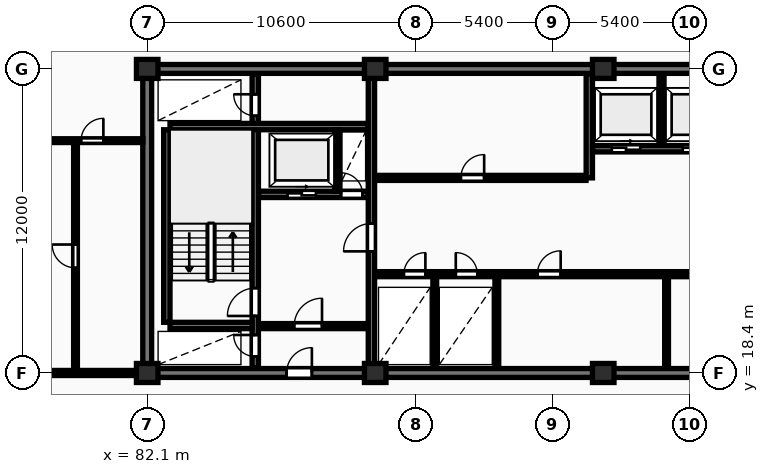
"""IFC4 building model, lengths in metres.
Left out: names, types, materials, properties, quantities, classifications, styles, units other than length and angle.
Written with IfcOpenShell. Run it as: python <this file> out.ifc"""

import sys

from ifc_helpers import new_model, si_unit, direction, frame, frame_2d, origin, origin_2d, place, context, subcontext, project, spatial, rectangle, extrude, element, fill, save


model = new_model("IFC4")
c1 = context("Model", 3, precision=1e-05, world=origin(), true_north=direction((0.0, 1.0)))
c2 = subcontext(c1, "Body", "Model", "MODEL_VIEW")
j1 = project(units=[si_unit("LENGTHUNIT", "METRE"), si_unit("PLANEANGLEUNIT", "RADIAN")], contexts=[c1])
p1 = place(None, origin())
s1 = spatial("IfcSite", under=j1, at=p1, CompositionType="ELEMENT")
p2 = place(p1, origin())
s2 = spatial("IfcBuilding", under=s1, at=p2, CompositionType="ELEMENT")
p3 = place(p2, frame((0.0, 0.0, 132.8)))
s3 = spatial("IfcBuildingStorey", under=s2, at=p3, CompositionType="ELEMENT", Elevation=132.8)
for number, where, z_axis, x_axis in (
    (1, (82.1, 18.4, 0.0), (0.0, 0.0, 1.0), (1.0, 0.0, 0.0)),
    (2, (82.1, 30.4, 0.0), (0.0, 0.0, 1.0), (1.0, 0.0, 0.0)),
    (3, (91.1, 18.4, 0.0), (0.0, 0.0, 1.0), (1.0, 0.0, 0.0)),
    (4, (91.1, 30.4, 0.0), (0.0, 0.0, 1.0), (1.0, 0.0, 0.0)),
    (5, (100.1, 18.4, 0.0), (0.0, 0.0, 1.0), (1.0, 0.0, 0.0)),
    (6, (100.1, 30.4, 0.0), (0.0, 0.0, 1.0), (1.0, 0.0, 0.0)),
):
    element("IfcColumn", number, at=place(p3, frame(where, z_axis=z_axis, x_axis=x_axis)), inside=s3, PredefinedType="COLUMN", context=c2, shape_type="SweptSolid", body=[
        extrude(rectangle(XDim=0.85, YDim=0.75, at=origin_2d()), origin(), (0.0, 0.0, 1.0), 3.25),
    ])
p4 = place(p3, frame((81.925, 30.4, 0.0), z_axis=(0.0, 0.0, 1.0), x_axis=(1.0, 0.0, 0.0)))
e7 = element("IfcWall", 7, at=p4, inside=s3, PredefinedType="SHEAR", context=c2, shape_type="SweptSolid", body=[
    extrude(rectangle(XDim=36.265, YDim=0.35, at=frame_2d((18.132, 0.0))), origin(), (0.0, 0.0, 1.0), 3.25),
])
p5 = place(p3, frame((82.1, 18.575, 0.0), z_axis=(0.0, 0.0, 1.0), x_axis=(0.0, 1.0, 0.0)))
e8 = element("IfcWall", 8, at=p5, inside=s3, PredefinedType="SHEAR", context=c2, shape_type="SweptSolid", body=[
    extrude(rectangle(XDim=11.65, YDim=0.35, at=frame_2d((5.825, 0.0))), origin(), (0.0, 0.0, 1.0), 3.25),
])
p6 = place(p3, frame((81.925, 18.4, 0.0), z_axis=(0.0, 0.0, 1.0), x_axis=(1.0, 0.0, 0.0)))
e9 = element("IfcWall", 9, at=p6, inside=s3, PredefinedType="SHEAR", context=c2, shape_type="SweptSolid", body=[
    extrude(rectangle(XDim=36.265, YDim=0.35, at=frame_2d((18.132, 0.0))), origin(), (0.0, 0.0, 1.0), 3.25),
])
p7 = place(p6, frame((5.675, 0.0, 0.0)))
e10 = element("IfcOpeningElement", 10, at=p7, cuts=e9, PredefinedType="OPENING", context=c2, shape_type="SweptSolid", body=[
    extrude(rectangle(XDim=1.0, YDim=2.15, at=frame_2d((0.5, 1.075))), frame((0.0, 0.185, 0.0), z_axis=(0.0, -1.0, 0.0), x_axis=(1.0, 0.0, 0.0)), (0.0, 0.0, 1.0), 0.37),
])
p8 = place(p6, frame((21.925, 0.0, 0.0)))
e11 = element("IfcOpeningElement", 11, at=p8, cuts=e9, PredefinedType="OPENING", context=c2, shape_type="SweptSolid", body=[
    extrude(rectangle(XDim=1.5, YDim=2.2, at=frame_2d((0.75, 1.1))), frame((0.0, 0.185, 0.0), z_axis=(0.0, -1.0, 0.0), x_axis=(1.0, 0.0, 0.0)), (0.0, 0.0, 1.0), 0.37),
])
p9 = place(p6, frame((29.875, 0.0, 0.0)))
e12 = element("IfcOpeningElement", 12, at=p9, cuts=e9, PredefinedType="OPENING", context=c2, shape_type="SweptSolid", body=[
    extrude(rectangle(XDim=1.0, YDim=2.15, at=frame_2d((0.5, 1.075))), frame((0.0, 0.185, 0.0), z_axis=(0.0, -1.0, 0.0), x_axis=(1.0, 0.0, 0.0)), (0.0, 0.0, 1.0), 0.37),
])
p10 = place(p3, frame((82.875, 20.4, 0.0), z_axis=(0.0, 0.0, 1.0), x_axis=(0.0, 1.0, 0.0)))
e13 = element("IfcWall", 13, at=p10, inside=s3, PredefinedType="SHEAR", context=c2, shape_type="SweptSolid", body=[
    extrude(rectangle(XDim=7.6, YDim=0.25, at=frame_2d((3.8, 0.0))), origin(), (0.0, 0.0, 1.0), 3.25),
])
p11 = place(p3, frame((86.365, 18.6, 0.0), z_axis=(0.0, 0.0, 1.0), x_axis=(0.0, 1.0, 0.0)))
e14 = element("IfcWall", 14, at=p11, inside=s3, PredefinedType="SHEAR", context=c2, shape_type="SweptSolid", body=[
    extrude(rectangle(XDim=11.6, YDim=0.25, at=frame_2d((5.8, 0.0))), origin(), (0.0, 0.0, 1.0), 3.25),
])
p12 = place(p11, frame((0.45, 0.0, 0.0)))
e15 = element("IfcOpeningElement", 15, at=p12, cuts=e14, PredefinedType="OPENING", context=c2, shape_type="SweptSolid", body=[
    extrude(rectangle(XDim=0.85, YDim=2.05, at=frame_2d((0.425, 1.025))), frame((0.0, 0.135, 0.0), z_axis=(0.0, -1.0, 0.0), x_axis=(1.0, 0.0, 0.0)), (0.0, 0.0, 1.0), 0.27),
])
p13 = place(p11, frame((2.05, 0.0, 0.0)))
e16 = element("IfcOpeningElement", 16, at=p13, cuts=e14, PredefinedType="OPENING", context=c2, shape_type="SweptSolid", body=[
    extrude(rectangle(XDim=1.1, YDim=2.1, at=frame_2d((0.55, 1.05))), frame((0.0, 0.135, 0.0), z_axis=(0.0, -1.0, 0.0), x_axis=(1.0, 0.0, 0.0)), (0.0, 0.0, 1.0), 0.27),
])
p14 = place(p11, frame((9.95, 0.0, 0.0)))
e17 = element("IfcOpeningElement", 17, at=p14, cuts=e14, PredefinedType="OPENING", context=c2, shape_type="SweptSolid", body=[
    extrude(rectangle(XDim=0.85, YDim=2.05, at=frame_2d((0.425, 1.025))), frame((0.0, 0.135, 0.0), z_axis=(0.0, -1.0, 0.0), x_axis=(1.0, 0.0, 0.0)), (0.0, 0.0, 1.0), 0.27),
])
p15 = place(p3, frame((83.0, 20.275, 0.0), z_axis=(0.0, 0.0, 1.0), x_axis=(1.0, 0.0, 0.0)))
e18 = element("IfcWall", 18, at=p15, inside=s3, PredefinedType="SHEAR", context=c2, shape_type="SweptSolid", body=[
    extrude(rectangle(XDim=3.24, YDim=0.25, at=frame_2d((1.62, 0.0))), origin(), (0.0, 0.0, 1.0), 3.25),
])
p16 = place(p3, frame((83.0, 28.125, 0.0), z_axis=(0.0, 0.0, 1.0), x_axis=(1.0, 0.0, 0.0)))
e19 = element("IfcWall", 19, at=p16, inside=s3, PredefinedType="SHEAR", context=c2, shape_type="SweptSolid", body=[
    extrude(rectangle(XDim=7.82, YDim=0.25, at=frame_2d((3.91, 0.0))), origin(), (0.0, 0.0, 1.0), 3.25),
])
p17 = place(p3, frame((86.5, 25.45, 0.0), z_axis=(0.0, 0.0, 1.0), x_axis=(1.0, 0.0, 0.0)))
e20 = element("IfcWall", 20, at=p17, inside=s3, PredefinedType="SHEAR", context=c2, shape_type="SweptSolid", body=[
    extrude(rectangle(XDim=4.32, YDim=0.25, at=frame_2d((2.16, 0.0))), origin(), (0.0, 0.0, 1.0), 3.25),
])
p18 = place(p17, frame((1.14, 0.0, 0.0)))
e21 = element("IfcOpeningElement", 21, at=p18, cuts=e20, PredefinedType="OPENING", context=c2, shape_type="SweptSolid", body=[
    extrude(rectangle(XDim=1.12, YDim=2.12, at=frame_2d((0.56, 1.06))), frame((0.0, 0.135, 0.0), z_axis=(0.0, -1.0, 0.0), x_axis=(1.0, 0.0, 0.0)), (0.0, 0.0, 1.0), 0.27),
])
p19 = place(p17, frame((3.25, 0.0, 0.0)))
e22 = element("IfcOpeningElement", 22, at=p19, cuts=e20, PredefinedType="OPENING", context=c2, shape_type="SweptSolid", body=[
    extrude(rectangle(XDim=0.85, YDim=2.05, at=frame_2d((0.425, 1.025))), frame((0.0, 0.135, 0.0), z_axis=(0.0, -1.0, 0.0), x_axis=(1.0, 0.0, 0.0)), (0.0, 0.0, 1.0), 0.27),
])
p20 = place(p3, frame((89.6, 25.58, 0.0), z_axis=(0.0, 0.0, 1.0), x_axis=(0.0, 1.0, 0.0)))
e23 = element("IfcWall", 23, at=p20, inside=s3, PredefinedType="PARTITIONING", context=c2, shape_type="SweptSolid", body=[
    extrude(rectangle(XDim=2.42, YDim=0.2, at=frame_2d((1.21, 0.0))), origin(), (0.0, 0.0, 1.0), 2.97),
])
p21 = place(p3, frame((86.5, 20.25, 0.0), z_axis=(0.0, 0.0, 1.0), x_axis=(1.0, 0.0, 0.0)))
e24 = element("IfcWall", 24, at=p21, inside=s3, PredefinedType="PARTITIONING", context=c2, shape_type="SweptSolid", body=[
    extrude(rectangle(XDim=4.32, YDim=0.2, at=frame_2d((2.16, 0.0))), origin(), (0.0, 0.0, 1.0), 2.97),
])
p22 = place(p21, frame((1.4, 0.0, 0.0)))
e25 = element("IfcOpeningElement", 25, at=p22, cuts=e24, PredefinedType="OPENING", context=c2, shape_type="SweptSolid", body=[
    extrude(rectangle(XDim=1.1, YDim=2.1, at=frame_2d((0.55, 1.05))), frame((0.0, 0.11, 0.0), z_axis=(0.0, -1.0, 0.0), x_axis=(1.0, 0.0, 0.0)), (0.0, 0.0, 1.0), 0.22),
])
p23 = place(p3, frame((90.95, 18.6, 0.0), z_axis=(0.0, 0.0, 1.0), x_axis=(0.0, 1.0, 0.0)))
e26 = element("IfcWall", 26, at=p23, inside=s3, PredefinedType="SHEAR", context=c2, shape_type="SweptSolid", body=[
    extrude(rectangle(XDim=11.6, YDim=0.25, at=frame_2d((5.8, 0.0))), origin(), (0.0, 0.0, 1.0), 3.25),
])
p24 = place(p23, frame((4.6, 0.0, 0.0)))
e27 = element("IfcOpeningElement", 27, at=p24, cuts=e26, PredefinedType="OPENING", context=c2, shape_type="SweptSolid", body=[
    extrude(rectangle(XDim=1.1, YDim=2.1, at=frame_2d((0.55, 1.05))), frame((0.0, 0.135, 0.0), z_axis=(0.0, -1.0, 0.0), x_axis=(1.0, 0.0, 0.0)), (0.0, 0.0, 1.0), 0.27),
])
p25 = place(p3, frame((91.08, 26.1, 0.0), z_axis=(0.0, 0.0, 1.0), x_axis=(1.0, 0.0, 0.0)))
e28 = element("IfcWall", 28, at=p25, inside=s3, PredefinedType="PARTITIONING", context=c2, shape_type="SweptSolid", body=[
    extrude(rectangle(XDim=8.34, YDim=0.2, at=frame_2d((4.17, 0.0))), origin(), (0.0, 0.0, 1.0), 2.97),
])
p26 = place(p25, frame((3.4, 0.0, 0.0)))
e29 = element("IfcOpeningElement", 29, at=p26, cuts=e28, PredefinedType="OPENING", context=c2, shape_type="SweptSolid", body=[
    extrude(rectangle(XDim=0.92, YDim=2.08, at=frame_2d((0.46, 1.04))), frame((0.0, 0.11, 0.0), z_axis=(0.0, -1.0, 0.0), x_axis=(1.0, 0.0, 0.0)), (0.0, 0.0, 1.0), 0.22),
])
p27 = place(p3, frame((99.55, 26.1, 0.0), z_axis=(0.0, 0.0, 1.0), x_axis=(0.0, 1.0, 0.0)))
e30 = element("IfcWall", 30, at=p27, inside=s3, PredefinedType="SHEAR", context=c2, shape_type="SweptSolid", body=[
    extrude(rectangle(XDim=4.1, YDim=0.25, at=frame_2d((2.05, 0.0))), origin(), (0.0, 0.0, 1.0), 3.25),
])
p28 = place(p3, frame((102.4, 27.38, 0.0), z_axis=(0.0, 0.0, 1.0), x_axis=(0.0, 1.0, 0.0)))
e31 = element("IfcWall", 31, at=p28, inside=s3, PredefinedType="PARTITIONING", context=c2, shape_type="SweptSolid", body=[
    extrude(rectangle(XDim=2.82, YDim=0.2, at=frame_2d((1.41, 0.0))), origin(), (0.0, 0.0, 1.0), 2.97),
])
p29 = place(p3, frame((99.68, 27.25, 0.0), z_axis=(0.0, 0.0, 1.0), x_axis=(1.0, 0.0, 0.0)))
e32 = element("IfcWall", 32, at=p29, inside=s3, PredefinedType="SHEAR", context=c2, shape_type="SweptSolid", body=[
    extrude(rectangle(XDim=10.54, YDim=0.25, at=frame_2d((5.27, 0.0))), origin(), (0.0, 0.0, 1.0), 3.25),
])
p30 = place(p29, frame((0.76, 0.0, 0.0)))
e33 = element("IfcOpeningElement", 33, at=p30, cuts=e32, PredefinedType="OPENING", context=c2, shape_type="SweptSolid", body=[
    extrude(rectangle(XDim=1.12, YDim=2.12, at=frame_2d((0.56, 1.06))), frame((0.0, 0.135, 0.0), z_axis=(0.0, -1.0, 0.0), x_axis=(1.0, 0.0, 0.0)), (0.0, 0.0, 1.0), 0.27),
])
p31 = place(p29, frame((3.56, 0.0, 0.0)))
e34 = element("IfcOpeningElement", 34, at=p31, cuts=e32, PredefinedType="OPENING", context=c2, shape_type="SweptSolid", body=[
    extrude(rectangle(XDim=1.12, YDim=2.12, at=frame_2d((0.56, 1.06))), frame((0.0, 0.135, 0.0), z_axis=(0.0, -1.0, 0.0), x_axis=(1.0, 0.0, 0.0)), (0.0, 0.0, 1.0), 0.27),
])
p32 = place(p29, frame((6.36, 0.0, 0.0)))
e35 = element("IfcOpeningElement", 35, at=p32, cuts=e32, PredefinedType="OPENING", context=c2, shape_type="SweptSolid", body=[
    extrude(rectangle(XDim=1.12, YDim=2.12, at=frame_2d((0.56, 1.06))), frame((0.0, 0.135, 0.0), z_axis=(0.0, -1.0, 0.0), x_axis=(1.0, 0.0, 0.0)), (0.0, 0.0, 1.0), 0.27),
])
p33 = place(p29, frame((8.92, 0.0, 0.0)))
e36 = element("IfcOpeningElement", 36, at=p33, cuts=e32, PredefinedType="OPENING", context=c2, shape_type="SweptSolid", body=[
    extrude(rectangle(XDim=0.85, YDim=2.05, at=frame_2d((0.425, 1.025))), frame((0.0, 0.135, 0.0), z_axis=(0.0, -1.0, 0.0), x_axis=(1.0, 0.0, 0.0)), (0.0, 0.0, 1.0), 0.27),
])
for number, where, z_axis, x_axis in (
    (37, (93.45, 18.6, 0.0), (0.0, 0.0, 1.0), (0.0, 1.0, 0.0)),
    (38, (95.9, 18.6, 0.0), (0.0, 0.0, 1.0), (0.0, 1.0, 0.0)),
    (39, (102.6, 18.6, 0.0), (0.0, 0.0, 1.0), (0.0, 1.0, 0.0)),
):
    element("IfcWall", number, at=place(p3, frame(where, z_axis=z_axis, x_axis=x_axis)), inside=s3, PredefinedType="PARTITIONING", context=c2, shape_type="SweptSolid", body=[
        extrude(rectangle(XDim=3.6, YDim=0.15, at=frame_2d((1.8, 0.0))), origin(), (0.0, 0.0, 1.0), 2.97),
    ])
p34 = place(p3, frame((91.08, 22.3, 0.0), z_axis=(0.0, 0.0, 1.0), x_axis=(1.0, 0.0, 0.0)))
e40 = element("IfcWall", 40, at=p34, inside=s3, PredefinedType="PARTITIONING", context=c2, shape_type="SweptSolid", body=[
    extrude(rectangle(XDim=19.14, YDim=0.2, at=frame_2d((9.57, 0.0))), origin(), (0.0, 0.0, 1.0), 2.97),
])
p35 = place(p34, frame((1.15, 0.0, 0.0)))
e41 = element("IfcOpeningElement", 41, at=p35, cuts=e40, PredefinedType="OPENING", context=c2, shape_type="SweptSolid", body=[
    extrude(rectangle(XDim=0.85, YDim=2.05, at=frame_2d((0.425, 1.025))), frame((0.0, 0.11, 0.0), z_axis=(0.0, -1.0, 0.0), x_axis=(1.0, 0.0, 0.0)), (0.0, 0.0, 1.0), 0.22),
])
p36 = place(p34, frame((3.2, 0.0, 0.0)))
e42 = element("IfcOpeningElement", 42, at=p36, cuts=e40, PredefinedType="OPENING", context=c2, shape_type="SweptSolid", body=[
    extrude(rectangle(XDim=0.85, YDim=2.05, at=frame_2d((0.425, 1.025))), frame((0.0, 0.11, 0.0), z_axis=(0.0, -1.0, 0.0), x_axis=(1.0, 0.0, 0.0)), (0.0, 0.0, 1.0), 0.22),
])
p37 = place(p34, frame((12.72, 0.0, 0.0)))
e43 = element("IfcOpeningElement", 43, at=p37, cuts=e40, PredefinedType="OPENING", context=c2, shape_type="SweptSolid", body=[
    extrude(rectangle(XDim=1.5, YDim=2.2, at=frame_2d((0.75, 1.1))), frame((0.0, 0.11, 0.0), z_axis=(0.0, -1.0, 0.0), x_axis=(1.0, 0.0, 0.0)), (0.0, 0.0, 1.0), 0.22),
])
p38 = place(p34, frame((6.42, 0.0, 0.0)))
e44 = element("IfcOpeningElement", 44, at=p38, cuts=e40, PredefinedType="OPENING", context=c2, shape_type="SweptSolid", body=[
    extrude(rectangle(XDim=0.92, YDim=2.08, at=frame_2d((0.46, 1.04))), frame((0.0, 0.11, 0.0), z_axis=(0.0, -1.0, 0.0), x_axis=(1.0, 0.0, 0.0)), (0.0, 0.0, 1.0), 0.22),
])
p39 = place(p34, frame((15.87, 0.0, 0.0)))
e45 = element("IfcOpeningElement", 45, at=p39, cuts=e40, PredefinedType="OPENING", context=c2, shape_type="SweptSolid", body=[
    extrude(rectangle(XDim=0.92, YDim=2.08, at=frame_2d((0.46, 1.04))), frame((0.0, 0.11, 0.0), z_axis=(0.0, -1.0, 0.0), x_axis=(1.0, 0.0, 0.0)), (0.0, 0.0, 1.0), 0.22),
])
p40 = place(p3, frame((79.27, 18.45, 0.0), z_axis=(0.0, 0.0, 1.0), x_axis=(0.0, 1.0, 0.0)))
e46 = element("IfcWall", 46, at=p40, inside=s3, PredefinedType="PARTITIONING", context=c2, shape_type="SweptSolid", body=[
    extrude(rectangle(XDim=9.12, YDim=0.15, at=frame_2d((4.56, 0.0))), origin(), (0.0, 0.0, 1.0), 2.97),
])
p41 = place(p40, frame((4.1, 0.0, 0.0)))
e47 = element("IfcOpeningElement", 47, at=p41, cuts=e46, PredefinedType="OPENING", context=c2, shape_type="SweptSolid", body=[
    extrude(rectangle(XDim=0.92, YDim=2.08, at=frame_2d((0.46, 1.04))), frame((0.0, 0.085, 0.0), z_axis=(0.0, -1.0, 0.0), x_axis=(1.0, 0.0, 0.0)), (0.0, 0.0, 1.0), 0.17),
])
p42 = place(p3, frame((75.17, 27.57, 0.0), z_axis=(0.0, 0.0, 1.0), x_axis=(1.0, 0.0, 0.0)))
e48 = element("IfcWall", 48, at=p42, inside=s3, PredefinedType="PARTITIONING", context=c2, shape_type="SweptSolid", body=[
    extrude(rectangle(XDim=6.76, YDim=0.15, at=frame_2d((3.38, 0.0))), origin(), (0.0, 0.0, 1.0), 2.97),
])
p43 = place(p42, frame((1.266, 0.0, 0.0)))
e49 = element("IfcOpeningElement", 49, at=p43, cuts=e48, PredefinedType="OPENING", context=c2, shape_type="SweptSolid", body=[
    extrude(rectangle(XDim=0.84, YDim=2.04, at=frame_2d((0.42, 1.02))), frame((0.0, 0.085, 0.0), z_axis=(0.0, -1.0, 0.0), x_axis=(1.0, 0.0, 0.0)), (0.0, 0.0, 1.0), 0.17),
])
p44 = place(p42, frame((4.32, 0.0, 0.0)))
e50 = element("IfcOpeningElement", 50, at=p44, cuts=e48, PredefinedType="OPENING", context=c2, shape_type="SweptSolid", body=[
    extrude(rectangle(XDim=0.88, YDim=2.06, at=frame_2d((0.44, 1.03))), frame((0.0, 0.085, 0.0), z_axis=(0.0, -1.0, 0.0), x_axis=(1.0, 0.0, 0.0)), (0.0, 0.0, 1.0), 0.17),
])
p45 = place(p3, frame((72.7, 18.4, 0.0), z_axis=(0.0, 0.0, 1.0), x_axis=(1.0, 0.0, 0.0)))
e51 = element("IfcWall", 51, at=p45, inside=s3, PredefinedType="PARTITIONING", context=c2, shape_type="SweptSolid", body=[
    extrude(rectangle(XDim=9.25, YDim=0.2, at=frame_2d((4.625, 0.0))), origin(), (0.0, 0.0, 1.0), 2.358),
])
p46 = place(p45, frame((4.15, 0.0, 0.0)))
e52 = element("IfcOpeningElement", 52, at=p46, cuts=e51, PredefinedType="OPENING", context=c2, shape_type="SweptSolid", body=[
    extrude(rectangle(XDim=0.95, YDim=2.15, at=frame_2d((0.475, 1.075))), frame((0.0, 0.11, 0.0), z_axis=(0.0, -1.0, 0.0), x_axis=(1.0, 0.0, 0.0)), (0.0, 0.0, 1.0), 0.22),
])
p47 = place(p7, origin())
e53 = element("IfcDoor", 53, at=p47, inside=s3, OperationType="SINGLE_SWING_RIGHT", PredefinedType="DOOR", context=c2, shape_type="SweptSolid", body=[
    extrude(rectangle(XDim=1.0, YDim=2.15, at=frame_2d((0.5, 1.075))), frame((0.0, 0.025, 0.0), z_axis=(0.0, -1.0, 0.0), x_axis=(1.0, 0.0, 0.0)), (0.0, 0.0, 1.0), 0.05),
])
fill(e10, e53)
p48 = place(p12, origin())
e54 = element("IfcDoor", 54, at=p48, inside=s3, OperationType="SINGLE_SWING_RIGHT", PredefinedType="DOOR", context=c2, shape_type="SweptSolid", body=[
    extrude(rectangle(XDim=0.85, YDim=2.05, at=frame_2d((0.425, 1.025))), frame((0.0, 0.025, 0.0), z_axis=(0.0, -1.0, 0.0), x_axis=(1.0, 0.0, 0.0)), (0.0, 0.0, 1.0), 0.05),
])
fill(e15, e54)
p49 = place(p13, origin())
e55 = element("IfcDoor", 55, at=p49, inside=s3, OperationType="SINGLE_SWING_LEFT", PredefinedType="DOOR", context=c2, shape_type="SweptSolid", body=[
    extrude(rectangle(XDim=1.1, YDim=2.1, at=frame_2d((0.55, 1.05))), frame((0.0, 0.025, 0.0), z_axis=(0.0, -1.0, 0.0), x_axis=(1.0, 0.0, 0.0)), (0.0, 0.0, 1.0), 0.05),
])
fill(e16, e55)
p50 = place(p14, origin())
e56 = element("IfcDoor", 56, at=p50, inside=s3, OperationType="SINGLE_SWING_RIGHT", PredefinedType="DOOR", context=c2, shape_type="SweptSolid", body=[
    extrude(rectangle(XDim=0.85, YDim=2.05, at=frame_2d((0.425, 1.025))), frame((0.0, 0.025, 0.0), z_axis=(0.0, -1.0, 0.0), x_axis=(1.0, 0.0, 0.0)), (0.0, 0.0, 1.0), 0.05),
])
fill(e17, e56)
p51 = place(p18, origin())
e57 = element("IfcDoor", 57, at=p51, inside=s3, OperationType="SLIDING_TO_RIGHT", PredefinedType="DOOR", context=c2, shape_type="SweptSolid", body=[
    extrude(rectangle(XDim=1.12, YDim=2.12, at=frame_2d((0.56, 1.06))), frame((0.0, 0.025, 0.0), z_axis=(0.0, -1.0, 0.0), x_axis=(1.0, 0.0, 0.0)), (0.0, 0.0, 1.0), 0.05),
])
fill(e21, e57)
p52 = place(p19, origin())
e58 = element("IfcDoor", 58, at=p52, inside=s3, OperationType="SINGLE_SWING_LEFT", PredefinedType="DOOR", context=c2, shape_type="SweptSolid", body=[
    extrude(rectangle(XDim=0.85, YDim=2.05, at=frame_2d((0.425, 1.025))), frame((0.0, 0.025, 0.0), z_axis=(0.0, -1.0, 0.0), x_axis=(1.0, 0.0, 0.0)), (0.0, 0.0, 1.0), 0.05),
])
fill(e22, e58)
p53 = place(p22, origin())
e59 = element("IfcDoor", 59, at=p53, inside=s3, OperationType="SINGLE_SWING_RIGHT", PredefinedType="DOOR", context=c2, shape_type="SweptSolid", body=[
    extrude(rectangle(XDim=1.1, YDim=2.1, at=frame_2d((0.55, 1.05))), frame((0.0, 0.025, 0.0), z_axis=(0.0, -1.0, 0.0), x_axis=(1.0, 0.0, 0.0)), (0.0, 0.0, 1.0), 0.05),
])
fill(e25, e59)
p54 = place(p24, origin())
e60 = element("IfcDoor", 60, at=p54, inside=s3, OperationType="SINGLE_SWING_LEFT", PredefinedType="DOOR", context=c2, shape_type="SweptSolid", body=[
    extrude(rectangle(XDim=1.1, YDim=2.1, at=frame_2d((0.55, 1.05))), frame((0.0, 0.025, 0.0), z_axis=(0.0, -1.0, 0.0), x_axis=(1.0, 0.0, 0.0)), (0.0, 0.0, 1.0), 0.05),
])
fill(e27, e60)
p55 = place(p26, origin())
e61 = element("IfcDoor", 61, at=p55, inside=s3, OperationType="SINGLE_SWING_RIGHT", PredefinedType="DOOR", context=c2, shape_type="SweptSolid", body=[
    extrude(rectangle(XDim=0.92, YDim=2.08, at=frame_2d((0.46, 1.04))), frame((0.0, 0.025, 0.0), z_axis=(0.0, -1.0, 0.0), x_axis=(1.0, 0.0, 0.0)), (0.0, 0.0, 1.0), 0.05),
])
fill(e29, e61)
p56 = place(p30, origin())
e62 = element("IfcDoor", 62, at=p56, inside=s3, OperationType="SLIDING_TO_RIGHT", PredefinedType="DOOR", context=c2, shape_type="SweptSolid", body=[
    extrude(rectangle(XDim=1.12, YDim=2.12, at=frame_2d((0.56, 1.06))), frame((0.0, 0.025, 0.0), z_axis=(0.0, -1.0, 0.0), x_axis=(1.0, 0.0, 0.0)), (0.0, 0.0, 1.0), 0.05),
])
fill(e33, e62)
p57 = place(p31, origin())
e63 = element("IfcDoor", 63, at=p57, inside=s3, OperationType="SLIDING_TO_RIGHT", PredefinedType="DOOR", context=c2, shape_type="SweptSolid", body=[
    extrude(rectangle(XDim=1.12, YDim=2.12, at=frame_2d((0.56, 1.06))), frame((0.0, 0.025, 0.0), z_axis=(0.0, -1.0, 0.0), x_axis=(1.0, 0.0, 0.0)), (0.0, 0.0, 1.0), 0.05),
])
fill(e34, e63)
p58 = place(p35, origin())
e64 = element("IfcDoor", 64, at=p58, inside=s3, OperationType="SINGLE_SWING_RIGHT", PredefinedType="DOOR", context=c2, shape_type="SweptSolid", body=[
    extrude(rectangle(XDim=0.85, YDim=2.05, at=frame_2d((0.425, 1.025))), frame((0.0, 0.025, 0.0), z_axis=(0.0, -1.0, 0.0), x_axis=(1.0, 0.0, 0.0)), (0.0, 0.0, 1.0), 0.05),
])
fill(e41, e64)
p59 = place(p36, origin())
e65 = element("IfcDoor", 65, at=p59, inside=s3, OperationType="SINGLE_SWING_LEFT", PredefinedType="DOOR", context=c2, shape_type="SweptSolid", body=[
    extrude(rectangle(XDim=0.85, YDim=2.05, at=frame_2d((0.425, 1.025))), frame((0.0, 0.025, 0.0), z_axis=(0.0, -1.0, 0.0), x_axis=(1.0, 0.0, 0.0)), (0.0, 0.0, 1.0), 0.05),
])
fill(e42, e65)
p60 = place(p38, origin())
e66 = element("IfcDoor", 66, at=p60, inside=s3, OperationType="SINGLE_SWING_RIGHT", PredefinedType="DOOR", context=c2, shape_type="SweptSolid", body=[
    extrude(rectangle(XDim=0.92, YDim=2.08, at=frame_2d((0.46, 1.04))), frame((0.0, 0.025, 0.0), z_axis=(0.0, -1.0, 0.0), x_axis=(1.0, 0.0, 0.0)), (0.0, 0.0, 1.0), 0.05),
])
fill(e44, e66)
p61 = place(p41, origin())
e67 = element("IfcDoor", 67, at=p61, inside=s3, OperationType="SINGLE_SWING_RIGHT", PredefinedType="DOOR", context=c2, shape_type="SweptSolid", body=[
    extrude(rectangle(XDim=0.92, YDim=2.08, at=frame_2d((0.46, 1.04))), frame((0.0, 0.025, 0.0), z_axis=(0.0, -1.0, 0.0), x_axis=(1.0, 0.0, 0.0)), (0.0, 0.0, 1.0), 0.05),
])
fill(e47, e67)
p62 = place(p44, origin())
e68 = element("IfcDoor", 68, at=p62, inside=s3, OperationType="SINGLE_SWING_RIGHT", PredefinedType="DOOR", context=c2, shape_type="SweptSolid", body=[
    extrude(rectangle(XDim=0.88, YDim=2.06, at=frame_2d((0.44, 1.03))), frame((0.0, 0.025, 0.0), z_axis=(0.0, -1.0, 0.0), x_axis=(1.0, 0.0, 0.0)), (0.0, 0.0, 1.0), 0.05),
])
fill(e50, e68)
save(model, sys.argv[1])
